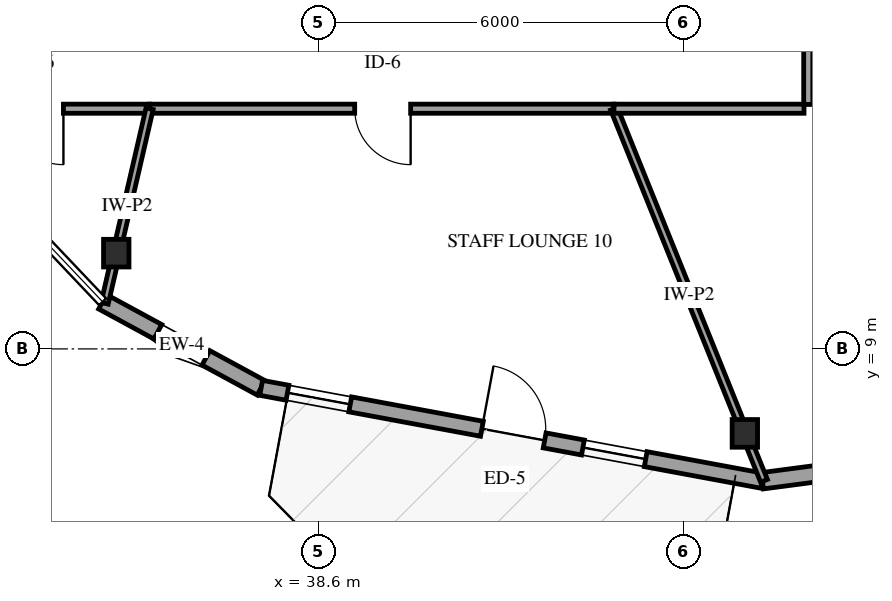
"""IFC4 building model, lengths in metres.
Left out: names, types, materials, properties, quantities, classifications, styles, units other than length and angle.
Written with IfcOpenShell. Run it as: python <this file> out.ifc"""

import sys

from ifc_helpers import new_model, si_unit, direction, frame, frame_2d, origin, origin_2d, place, context, subcontext, project, spatial, rectangle, i_section, extrude, element, fill, save


model = new_model("IFC4")
c1 = context("Model", 3, precision=1e-05, world=origin(), true_north=direction((0.0, 1.0)))
c2 = subcontext(c1, "Body", "Model", "MODEL_VIEW")
j1 = project(units=[si_unit("LENGTHUNIT", "METRE"), si_unit("PLANEANGLEUNIT", "RADIAN")], contexts=[c1])
p1 = place(None, origin())
s1 = spatial("IfcSite", under=j1, at=p1, CompositionType="ELEMENT")
p2 = place(p1, origin())
s2 = spatial("IfcBuilding", under=s1, at=p2, CompositionType="ELEMENT")
p3 = place(p2, frame((0.0, 0.0, 126.4)))
s3 = spatial("IfcBuildingStorey", under=s2, at=p3, CompositionType="ELEMENT", Elevation=126.4)
for number, where, z_axis, x_axis in (
    (1, (35.27, 10.575, 0.0), (0.0, 0.0, 1.0), (1.0, 0.0, 0.0)),
    (2, (45.607, 7.611, 0.0), (0.0, 0.0, 1.0), (1.0, 0.0, 0.0)),
):
    element("IfcColumn", number, at=place(p3, frame(where, z_axis=z_axis, x_axis=x_axis)), inside=s3, PredefinedType="COLUMN", context=c2, shape_type="SweptSolid", body=[
        extrude(i_section(OverallWidth=0.418, OverallDepth=0.455, WebThickness=0.042, FlangeThickness=0.068, FilletRadius=0.038, at=origin_2d()), origin(), (0.0, 0.0, 1.0), 3.9),
    ])
p4 = place(p3, frame((35.046, 9.775, 0.0), z_axis=(0.0, 0.0, 1.0), x_axis=(0.878806101886, -0.477179039028, 0.0)))
e3 = element("IfcWall", 3, at=p4, inside=s3, PredefinedType="SOLIDWALL", context=c2, shape_type="SweptSolid", body=[
    extrude(rectangle(XDim=2.967, YDim=0.27, at=frame_2d((1.483, 0.0))), origin(), (0.0, 0.0, 1.0), 2.979),
])
p5 = place(p4, frame((1.033, 0.0, 0.75)))
e4 = element("IfcOpeningElement", 4, at=p5, cuts=e3, PredefinedType="OPENING", context=c2, shape_type="SweptSolid", body=[
    extrude(rectangle(XDim=0.9, YDim=1.5, at=frame_2d((0.45, 0.75))), frame((0.0, 0.145, 0.0), z_axis=(0.0, -1.0, 0.0), x_axis=(1.0, 0.0, 0.0)), (0.0, 0.0, 1.0), 0.29),
])
p6 = place(p3, frame((45.896, 6.832, 0.0), z_axis=(0.0, 0.0, 1.0), x_axis=(0.991434395997, 0.130605660036, 0.0)))
e5 = element("IfcWall", 5, at=p6, inside=s3, PredefinedType="SOLIDWALL", context=c2, shape_type="SweptSolid", body=[
    extrude(rectangle(XDim=2.967, YDim=0.27, at=frame_2d((1.483, 0.0))), origin(), (0.0, 0.0, 1.0), 2.979),
])
p7 = place(p6, frame((1.033, 0.0, 0.75)))
e6 = element("IfcOpeningElement", 6, at=p7, cuts=e5, PredefinedType="OPENING", context=c2, shape_type="SweptSolid", body=[
    extrude(rectangle(XDim=0.9, YDim=1.5, at=frame_2d((0.45, 0.75))), frame((0.0, 0.145, 0.0), z_axis=(0.0, -1.0, 0.0), x_axis=(1.0, 0.0, 0.0)), (0.0, 0.0, 1.0), 0.29),
])
p8 = place(p3, frame((37.653, 8.359, 0.0), z_axis=(0.0, 0.0, 1.0), x_axis=(0.983253798772, -0.182241507899, 0.0)))
e7 = element("IfcWall", 7, at=p8, inside=s3, PredefinedType="SOLIDWALL", context=c2, shape_type="SweptSolid", body=[
    extrude(rectangle(XDim=8.384, YDim=0.25, at=frame_2d((4.192, 0.0))), origin(), (0.0, 0.0, 1.0), 2.979),
])
p9 = place(p8, frame((3.692, 0.0, 0.0)))
e8 = element("IfcOpeningElement", 8, at=p9, cuts=e7, PredefinedType="OPENING", context=c2, shape_type="SweptSolid", body=[
    extrude(rectangle(XDim=1.05, YDim=2.15, at=frame_2d((0.525, 1.075))), frame((0.0, 0.135, 0.0), z_axis=(0.0, -1.0, 0.0), x_axis=(1.0, 0.0, 0.0)), (0.0, 0.0, 1.0), 0.27),
])
p10 = place(p8, frame((0.44, 0.0, 0.72)))
e9 = element("IfcOpeningElement", 9, at=p10, cuts=e7, PredefinedType="OPENING", context=c2, shape_type="SweptSolid", body=[
    extrude(rectangle(XDim=1.05, YDim=1.55, at=frame_2d((0.525, 0.775))), frame((0.0, 0.135, 0.0), z_axis=(0.0, -1.0, 0.0), x_axis=(1.0, 0.0, 0.0)), (0.0, 0.0, 1.0), 0.27),
])
p11 = place(p8, frame((5.382, 0.0, 0.72)))
e10 = element("IfcOpeningElement", 10, at=p11, cuts=e7, PredefinedType="OPENING", context=c2, shape_type="SweptSolid", body=[
    extrude(rectangle(XDim=1.05, YDim=1.55, at=frame_2d((0.525, 0.775))), frame((0.0, 0.135, 0.0), z_axis=(0.0, -1.0, 0.0), x_axis=(1.0, 0.0, 0.0)), (0.0, 0.0, 1.0), 0.27),
])
p12 = place(p3, frame((46.65, 18.55, 0.0), z_axis=(0.0, 0.0, 1.0), x_axis=(0.780390500905, -0.625292464449, 0.0)))
e11 = element("IfcWall", 11, at=p12, inside=s3, PredefinedType="PARTITIONING", context=c2, shape_type="SweptSolid", body=[
    extrude(rectangle(XDim=12.406, YDim=0.1, at=frame_2d((6.203, 0.0))), origin(), (0.0, 0.0, 1.0), 2.978),
])
p13 = place(p3, frame((43.455, 12.95, 0.0), z_axis=(0.0, 0.0, 1.0), x_axis=(-1.0, 0.0, 0.0)))
e12 = element("IfcWall", 12, at=p13, inside=s3, PredefinedType="PARTITIONING", context=c2, shape_type="SweptSolid", body=[
    extrude(rectangle(XDim=7.637, YDim=0.15, at=frame_2d((3.818, 0.0))), origin(), (0.0, 0.0, 1.0), 3.6),
])
p14 = place(p13, frame((3.344, 0.0, 0.0)))
e13 = element("IfcOpeningElement", 13, at=p14, cuts=e12, PredefinedType="OPENING", context=c2, shape_type="SweptSolid", body=[
    extrude(rectangle(XDim=0.92, YDim=2.12, at=frame_2d((0.46, 1.06))), frame((0.0, 0.085, 0.0), z_axis=(0.0, -1.0, 0.0), x_axis=(1.0, 0.0, 0.0)), (0.0, 0.0, 1.0), 0.17),
])
p15 = place(p3, frame((43.455, 12.95, 0.0), z_axis=(0.0, 0.0, 1.0), x_axis=(0.37393496539, -0.927454927023, 0.0)))
e14 = element("IfcWall", 14, at=p15, inside=s3, PredefinedType="PARTITIONING", context=c2, shape_type="SweptSolid", body=[
    extrude(rectangle(XDim=6.597, YDim=0.12, at=frame_2d((3.299, 0.0))), origin(), (0.0, 0.0, 1.0), 2.895),
])
p16 = place(p3, frame((46.65, 18.55, 0.0), z_axis=(0.0, 0.0, 1.0), x_axis=(0.0, -1.0, 0.0)))
e15 = element("IfcWall", 15, at=p16, inside=s3, PredefinedType="PARTITIONING", context=c2, shape_type="SweptSolid", body=[
    extrude(rectangle(XDim=5.53, YDim=0.15, at=frame_2d((2.765, 0.0))), origin(), (0.0, 0.0, 1.0), 3.6),
])
p17 = place(p16, frame((2.29, 0.0, 0.0)))
e16 = element("IfcOpeningElement", 16, at=p17, cuts=e15, PredefinedType="OPENING", context=c2, shape_type="SweptSolid", body=[
    extrude(rectangle(XDim=0.92, YDim=2.12, at=frame_2d((0.46, 1.06))), frame((0.0, 0.085, 0.0), z_axis=(0.0, -1.0, 0.0), x_axis=(1.0, 0.0, 0.0)), (0.0, 0.0, 1.0), 0.17),
])
p18 = place(p3, frame((35.818, 12.95, 0.0), z_axis=(0.0, 0.0, 1.0), x_axis=(-1.0, 0.0, 0.0)))
e17 = element("IfcWall", 17, at=p18, inside=s3, PredefinedType="PARTITIONING", context=c2, shape_type="SweptSolid", body=[
    extrude(rectangle(XDim=3.785, YDim=0.15, at=frame_2d((1.893, 0.0))), origin(), (0.0, 0.0, 1.0), 3.6),
])
p19 = place(p18, frame((1.417, 0.0, 0.0)))
e18 = element("IfcOpeningElement", 18, at=p19, cuts=e17, PredefinedType="OPENING", context=c2, shape_type="SweptSolid", body=[
    extrude(rectangle(XDim=0.92, YDim=2.12, at=frame_2d((0.46, 1.06))), frame((0.0, 0.085, 0.0), z_axis=(0.0, -1.0, 0.0), x_axis=(1.0, 0.0, 0.0)), (0.0, 0.0, 1.0), 0.17),
])
p20 = place(p3, frame((35.818, 12.95, 0.0), z_axis=(0.0, 0.0, 1.0), x_axis=(-0.224957203043, -0.974368645226, 0.0)))
e19 = element("IfcWall", 19, at=p20, inside=s3, PredefinedType="PARTITIONING", context=c2, shape_type="SweptSolid", body=[
    extrude(rectangle(XDim=3.285, YDim=0.12, at=frame_2d((1.643, 0.0))), origin(), (0.0, 0.0, 1.0), 2.895),
])
p21 = place(p3, frame((46.58, 12.95, 0.0), z_axis=(0.0, 0.0, 1.0), x_axis=(-1.0, 0.0, 0.0)))
e20 = element("IfcWall", 20, at=p21, inside=s3, PredefinedType="PARTITIONING", context=c2, shape_type="SweptSolid", body=[
    extrude(rectangle(XDim=3.125, YDim=0.15, at=frame_2d((1.562, 0.0))), origin(), (0.0, 0.0, 1.0), 3.6),
])
p22 = place(p5, origin())
e21 = element("IfcWindow", 21, at=p22, inside=s3, PartitioningType="SINGLE_PANEL", PredefinedType="WINDOW", context=c2, shape_type="SweptSolid", body=[
    extrude(rectangle(XDim=0.9, YDim=1.5, at=frame_2d((0.45, 0.75))), frame((0.0, 0.03, 0.0), z_axis=(0.0, -1.0, 0.0), x_axis=(1.0, 0.0, 0.0)), (0.0, 0.0, 1.0), 0.06),
])
fill(e4, e21)
p23 = place(p9, origin())
e22 = element("IfcDoor", 22, at=p23, inside=s3, OperationType="SINGLE_SWING_LEFT", PredefinedType="DOOR", context=c2, shape_type="SweptSolid", body=[
    extrude(rectangle(XDim=1.05, YDim=2.15, at=frame_2d((0.525, 1.075))), frame((0.0, 0.025, 0.0), z_axis=(0.0, -1.0, 0.0), x_axis=(1.0, 0.0, 0.0)), (0.0, 0.0, 1.0), 0.05),
])
fill(e8, e22)
p24 = place(p10, origin())
e23 = element("IfcWindow", 23, at=p24, inside=s3, PartitioningType="SINGLE_PANEL", PredefinedType="WINDOW", context=c2, shape_type="SweptSolid", body=[
    extrude(rectangle(XDim=1.05, YDim=1.55, at=frame_2d((0.525, 0.775))), frame((0.0, 0.03, 0.0), z_axis=(0.0, -1.0, 0.0), x_axis=(1.0, 0.0, 0.0)), (0.0, 0.0, 1.0), 0.06),
])
fill(e9, e23)
p25 = place(p11, origin())
e24 = element("IfcWindow", 24, at=p25, inside=s3, PartitioningType="SINGLE_PANEL", PredefinedType="WINDOW", context=c2, shape_type="SweptSolid", body=[
    extrude(rectangle(XDim=1.05, YDim=1.55, at=frame_2d((0.525, 0.775))), frame((0.0, 0.03, 0.0), z_axis=(0.0, -1.0, 0.0), x_axis=(1.0, 0.0, 0.0)), (0.0, 0.0, 1.0), 0.06),
])
fill(e10, e24)
p26 = place(p14, origin())
e25 = element("IfcDoor", 25, at=p26, inside=s3, OperationType="SINGLE_SWING_LEFT", PredefinedType="DOOR", context=c2, shape_type="SweptSolid", body=[
    extrude(rectangle(XDim=0.92, YDim=2.12, at=frame_2d((0.46, 1.06))), frame((0.0, 0.025, 0.0), z_axis=(0.0, -1.0, 0.0), x_axis=(1.0, 0.0, 0.0)), (0.0, 0.0, 1.0), 0.05),
])
fill(e13, e25)
p27 = place(p19, origin())
e26 = element("IfcDoor", 26, at=p27, inside=s3, OperationType="SINGLE_SWING_LEFT", PredefinedType="DOOR", context=c2, shape_type="SweptSolid", body=[
    extrude(rectangle(XDim=0.92, YDim=2.12, at=frame_2d((0.46, 1.06))), frame((0.0, 0.025, 0.0), z_axis=(0.0, -1.0, 0.0), x_axis=(1.0, 0.0, 0.0)), (0.0, 0.0, 1.0), 0.05),
])
fill(e18, e26)
save(model, sys.argv[1])
